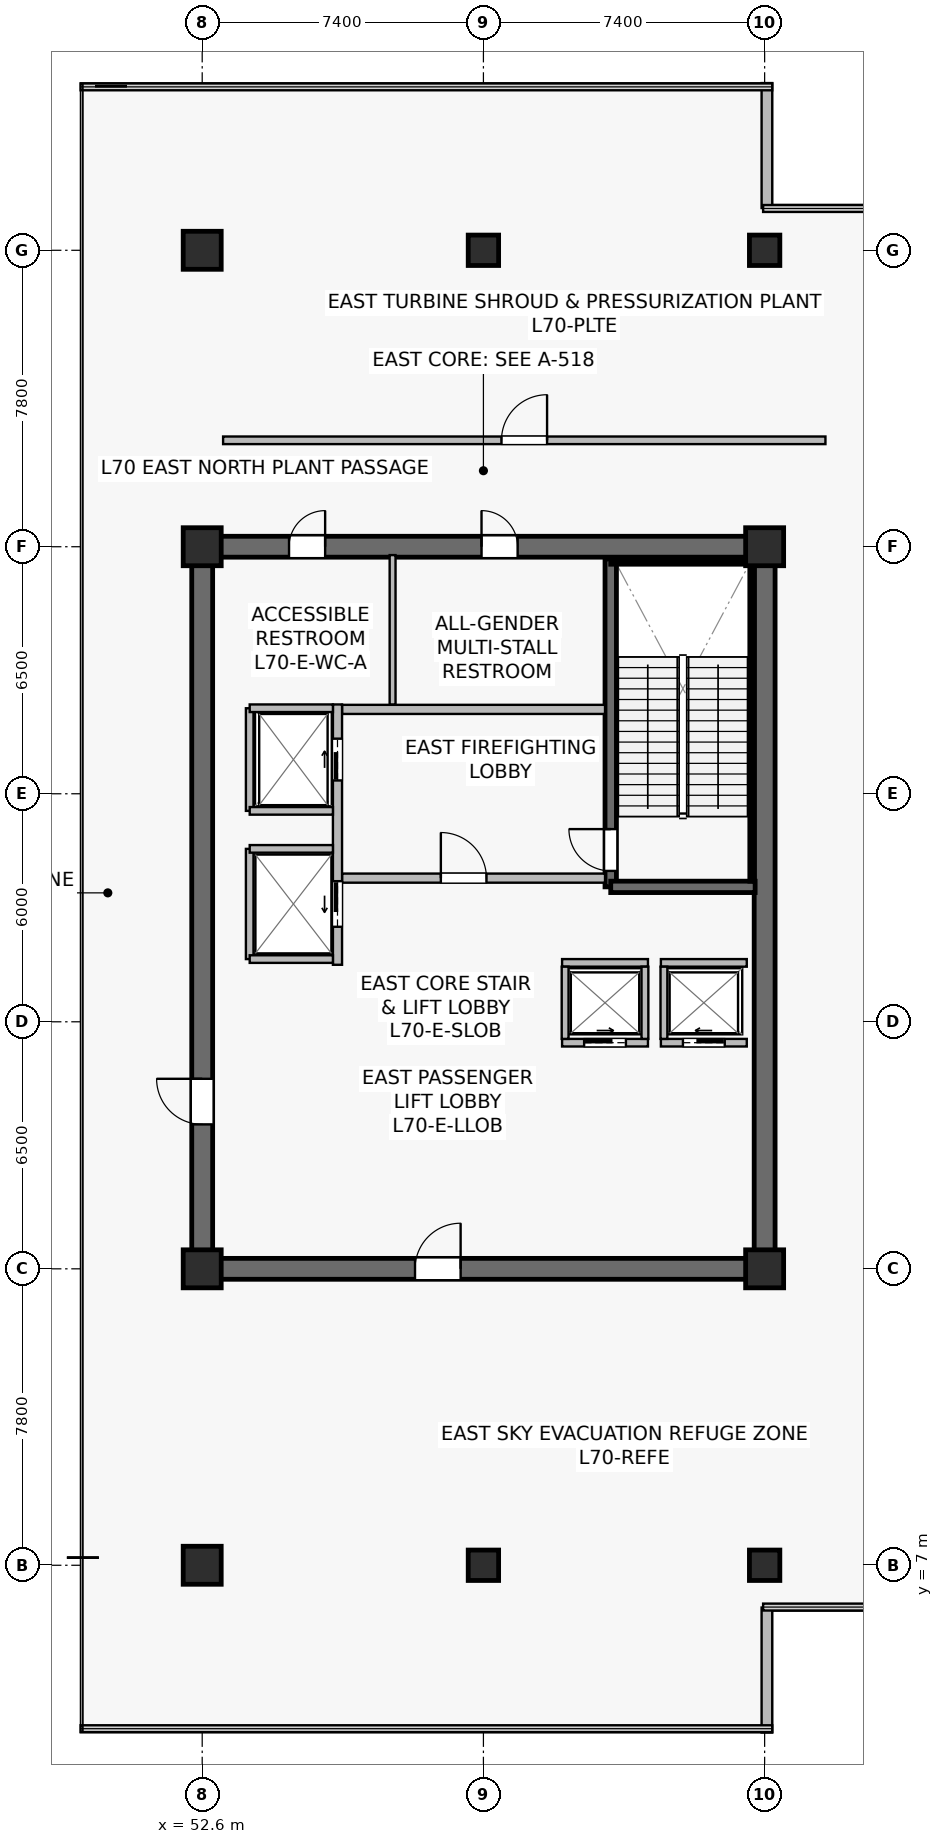
"""IFC4 building model, lengths in metres.
Left out: names, types, materials, properties, quantities, classifications, styles, units other than length and angle.
Written with IfcOpenShell. Run it as: python <this file> out.ifc"""

import sys

from ifc_helpers import new_model, si_unit, direction, frame, frame_2d, origin, origin_2d, place, context, subcontext, project, spatial, rectangle, extrude, source, transform, mapped, element, fill, save


model = new_model("IFC4")
c1 = context("Model", 3, precision=1e-05, world=origin(), true_north=direction((0.0, 1.0)))
c2 = subcontext(c1, "Body", "Model", "MODEL_VIEW")
j1 = project(units=[si_unit("LENGTHUNIT", "METRE"), si_unit("PLANEANGLEUNIT", "RADIAN")], contexts=[c1])
p1 = place(None, origin())
s1 = spatial("IfcSite", under=j1, at=p1, CompositionType="ELEMENT")
p2 = place(p1, origin())
s2 = spatial("IfcBuilding", under=s1, at=p2, CompositionType="ELEMENT")
p3 = place(p2, frame((0.0, 0.0, 291.6)))
s3 = spatial("IfcBuildingStorey", under=s2, at=p3, CompositionType="ELEMENT", Elevation=291.6)
p4 = place(p3, frame((52.325, 14.8, 0.0), z_axis=(0.0, 0.0, 1.0), x_axis=(1.0, 0.0, 0.0)))
e1 = element("IfcWall", 1, at=p4, inside=s3, PredefinedType="SHEAR", context=c2, shape_type="SweptSolid", body=[
    extrude(rectangle(XDim=15.35, YDim=0.55, at=frame_2d((7.675, 0.0))), origin(), (0.0, 0.0, 1.0), 5.7),
])
p5 = place(p4, frame((5.875, 0.0, 0.0)))
e2 = element("IfcOpeningElement", 2, at=p5, cuts=e1, PredefinedType="OPENING", context=c2, shape_type="SweptSolid", body=[
    extrude(rectangle(XDim=1.2, YDim=2.16, at=frame_2d((0.6, 1.08))), frame((0.0, 0.285, 0.0), z_axis=(0.0, -1.0, 0.0), x_axis=(1.0, 0.0, 0.0)), (0.0, 0.0, 1.0), 0.57),
])
p6 = place(p3, frame((52.325, 33.8, 0.0), z_axis=(0.0, 0.0, 1.0), x_axis=(1.0, 0.0, 0.0)))
e3 = element("IfcWall", 3, at=p6, inside=s3, PredefinedType="SHEAR", context=c2, shape_type="SweptSolid", body=[
    extrude(rectangle(XDim=15.35, YDim=0.55, at=frame_2d((7.675, 0.0))), origin(), (0.0, 0.0, 1.0), 5.7),
])
p7 = place(p6, frame((7.625, 0.0, 0.0)))
e4 = element("IfcOpeningElement", 4, at=p7, cuts=e3, PredefinedType="OPENING", context=c2, shape_type="SweptSolid", body=[
    extrude(rectangle(XDim=0.95, YDim=2.15, at=frame_2d((0.475, 1.075))), frame((0.0, 0.285, 0.0), z_axis=(0.0, -1.0, 0.0), x_axis=(1.0, 0.0, 0.0)), (0.0, 0.0, 1.0), 0.57),
])
p8 = place(p6, frame((2.56, 0.0, 0.0)))
e5 = element("IfcOpeningElement", 5, at=p8, cuts=e3, PredefinedType="OPENING", context=c2, shape_type="SweptSolid", body=[
    extrude(rectangle(XDim=0.95, YDim=2.15, at=frame_2d((0.475, 1.075))), frame((0.0, 0.285, 0.0), z_axis=(0.0, -1.0, 0.0), x_axis=(1.0, 0.0, 0.0)), (0.0, 0.0, 1.0), 0.57),
])
p9 = place(p3, frame((52.6, 15.075, 0.0), z_axis=(0.0, 0.0, 1.0), x_axis=(0.0, 1.0, 0.0)))
e6 = element("IfcWall", 6, at=p9, inside=s3, PredefinedType="SHEAR", context=c2, shape_type="SweptSolid", body=[
    extrude(rectangle(XDim=18.45, YDim=0.55, at=frame_2d((9.225, 0.0))), origin(), (0.0, 0.0, 1.0), 5.7),
])
p10 = place(p9, frame((3.525, 0.0, 0.0)))
e7 = element("IfcOpeningElement", 7, at=p10, cuts=e6, PredefinedType="OPENING", context=c2, shape_type="SweptSolid", body=[
    extrude(rectangle(XDim=1.2, YDim=2.16, at=frame_2d((0.6, 1.08))), frame((0.0, 0.285, 0.0), z_axis=(0.0, -1.0, 0.0), x_axis=(1.0, 0.0, 0.0)), (0.0, 0.0, 1.0), 0.57),
])
p11 = place(p3, frame((67.4, 15.075, 0.0), z_axis=(0.0, 0.0, 1.0), x_axis=(0.0, 1.0, 0.0)))
e8 = element("IfcWall", 8, at=p11, inside=s3, PredefinedType="SHEAR", context=c2, shape_type="SweptSolid", body=[
    extrude(rectangle(XDim=18.45, YDim=0.55, at=frame_2d((9.225, 0.0))), origin(), (0.0, 0.0, 1.0), 5.7),
])
p12 = place(p3, frame((63.35, 24.85, 0.0), z_axis=(0.0, 0.0, 1.0), x_axis=(0.0, 1.0, 0.0)))
e9 = element("IfcWall", 9, at=p12, inside=s3, PredefinedType="SHEAR", context=c2, shape_type="SweptSolid", body=[
    extrude(rectangle(XDim=8.63, YDim=0.3, at=frame_2d((4.315, 0.0))), origin(), (0.0, 0.0, 1.0), 5.7),
])
p13 = place(p12, frame((0.42, 0.0, 0.0)))
e10 = element("IfcOpeningElement", 10, at=p13, cuts=e9, PredefinedType="OPENING", context=c2, shape_type="SweptSolid", body=[
    extrude(rectangle(XDim=1.1, YDim=2.15, at=frame_2d((0.55, 1.075))), frame((0.0, 0.16, 0.0), z_axis=(0.0, -1.0, 0.0), x_axis=(1.0, 0.0, 0.0)), (0.0, 0.0, 1.0), 0.32),
])
p14 = place(p3, frame((63.35, 24.85, 0.0), z_axis=(0.0, 0.0, 1.0), x_axis=(1.0, 0.0, 0.0)))
e11 = element("IfcWall", 11, at=p14, inside=s3, PredefinedType="SHEAR", context=c2, shape_type="SweptSolid", body=[
    extrude(rectangle(XDim=3.8, YDim=0.3, at=frame_2d((1.9, 0.0))), origin(), (0.0, 0.0, 1.0), 5.7),
])
p15 = place(p3, frame((63.35, 33.4, 0.0), z_axis=(0.0, 0.0, 1.0), x_axis=(1.0, 0.0, 0.0)))
e12 = element("IfcWall", 12, at=p15, inside=s3, PredefinedType="SOLIDWALL", context=c2, shape_type="SweptSolid", body=[
    extrude(rectangle(XDim=3.72, YDim=0.12, at=frame_2d((1.86, 0.0))), origin(), (0.0, 0.0, 1.0), 5.7),
])
p16 = place(p3, frame((67.07, 25.0, 0.0), z_axis=(0.0, 0.0, 1.0), x_axis=(0.0, 1.0, 0.0)))
e13 = element("IfcWall", 13, at=p16, inside=s3, PredefinedType="SOLIDWALL", context=c2, shape_type="SweptSolid", body=[
    extrude(rectangle(XDim=8.32, YDim=0.12, at=frame_2d((4.16, 0.0))), origin(), (0.0, 0.0, 1.0), 5.7),
])
m1 = source(origin(), c2, "Body", "SweptSolid", [
    extrude(rectangle(XDim=1.0, YDim=1.0, at=origin_2d()), origin(), (0.0, 0.0, 1.0), 6.0),
])
p17 = place(p3, frame((52.6, 7.0, 0.0), z_axis=(0.0, 0.0, 1.0), x_axis=(1.0, 0.0, 0.0)))
e14 = element("IfcColumn", 14, at=p17, inside=s3, PredefinedType="COLUMN", context=c2, shape_type="MappedRepresentation", body=[
    mapped(m1, transform((0.0, 0.0, 0.0), scale=1.0)),
])
m2 = source(origin(), c2, "Body", "SweptSolid", [
    extrude(rectangle(XDim=0.8, YDim=0.8, at=origin_2d()), origin(), (0.0, 0.0, 1.0), 6.0),
])
p18 = place(p3, frame((60.0, 7.0, 0.0), z_axis=(0.0, 0.0, 1.0), x_axis=(1.0, 0.0, 0.0)))
e15 = element("IfcColumn", 15, at=p18, inside=s3, PredefinedType="COLUMN", context=c2, shape_type="MappedRepresentation", body=[
    mapped(m2, transform((0.0, 0.0, 0.0), scale=1.0)),
])
for number, where, z_axis, x_axis in (
    (16, (52.6, 14.8, 0.0), (0.0, 0.0, 1.0), (1.0, 0.0, 0.0)),
    (17, (67.4, 14.8, 0.0), (0.0, 0.0, 1.0), (1.0, 0.0, 0.0)),
    (18, (52.6, 33.8, 0.0), (0.0, 0.0, 1.0), (1.0, 0.0, 0.0)),
    (19, (67.4, 33.8, 0.0), (0.0, 0.0, 1.0), (1.0, 0.0, 0.0)),
    (20, (52.6, 41.6, 0.0), (0.0, 0.0, 1.0), (1.0, 0.0, 0.0)),
):
    element("IfcColumn", number, at=place(p3, frame(where, z_axis=z_axis, x_axis=x_axis)), inside=s3, PredefinedType="COLUMN", context=c2, shape_type="MappedRepresentation", body=[
        mapped(m1, transform((0.0, 0.0, 0.0), scale=1.0)),
    ])
for number, where, z_axis, x_axis in (
    (21, (60.0, 41.6, 0.0), (0.0, 0.0, 1.0), (1.0, 0.0, 0.0)),
    (22, (67.4, 7.0, 0.0), (0.0, 0.0, 1.0), (1.0, 0.0, 0.0)),
    (23, (67.4, 41.6, 0.0), (0.0, 0.0, 1.0), (1.0, 0.0, 0.0)),
):
    element("IfcColumn", number, at=place(p3, frame(where, z_axis=z_axis, x_axis=x_axis)), inside=s3, PredefinedType="COLUMN", context=c2, shape_type="MappedRepresentation", body=[
        mapped(m2, transform((0.0, 0.0, 0.0), scale=1.0)),
    ])
p19 = place(p3, frame((67.46, 2.6, 0.0), z_axis=(0.0, 0.0, 1.0), x_axis=(0.0, 1.0, 0.0)))
e24 = element("IfcWall", 24, at=p19, inside=s3, PredefinedType="STANDARD", context=c2, shape_type="SweptSolid", body=[
    extrude(rectangle(XDim=3.288, YDim=0.28, at=frame_2d((1.644, 0.0))), origin(), (0.0, 0.0, 1.0), 5.7),
])
p20 = place(p3, frame((67.46, 42.712, 0.0), z_axis=(0.0, 0.0, 1.0), x_axis=(0.0, 1.0, 0.0)))
e25 = element("IfcWall", 25, at=p20, inside=s3, PredefinedType="STANDARD", context=c2, shape_type="SweptSolid", body=[
    extrude(rectangle(XDim=3.288, YDim=0.28, at=frame_2d((1.644, 0.0))), origin(), (0.0, 0.0, 1.0), 5.7),
])
p21 = place(p3, frame((56.28, 25.08, 0.0), z_axis=(0.0, 0.0, 1.0), x_axis=(1.0, 0.0, 0.0)))
e26 = element("IfcWall", 26, at=p21, inside=s3, PredefinedType="SOLIDWALL", context=c2, shape_type="SweptSolid", body=[
    extrude(rectangle(XDim=6.92, YDim=0.24, at=frame_2d((3.46, 0.0))), origin(), (0.0, 0.0, 1.0), 5.097),
])
p22 = place(p21, frame((2.6, 0.0, 0.0)))
e27 = element("IfcOpeningElement", 27, at=p22, cuts=e26, PredefinedType="OPENING", context=c2, shape_type="SweptSolid", body=[
    extrude(rectangle(XDim=1.2, YDim=2.16, at=frame_2d((0.6, 1.08))), frame((0.0, 0.13, 0.0), z_axis=(0.0, -1.0, 0.0), x_axis=(1.0, 0.0, 0.0)), (0.0, 0.0, 1.0), 0.26),
])
p23 = place(p3, frame((56.28, 29.52, 0.0), z_axis=(0.0, 0.0, 1.0), x_axis=(1.0, 0.0, 0.0)))
e28 = element("IfcWall", 28, at=p23, inside=s3, PredefinedType="SOLIDWALL", context=c2, shape_type="SweptSolid", body=[
    extrude(rectangle(XDim=6.92, YDim=0.24, at=frame_2d((3.46, 0.0))), origin(), (0.0, 0.0, 1.0), 5.097),
])
p24 = place(p3, frame((56.16, 22.8, 0.0), z_axis=(0.0, 0.0, 1.0), x_axis=(0.0, 1.0, 0.0)))
e29 = element("IfcWall", 29, at=p24, inside=s3, PredefinedType="SOLIDWALL", context=c2, shape_type="SweptSolid", body=[
    extrude(rectangle(XDim=6.85, YDim=0.24, at=frame_2d((3.425, 0.0))), origin(), (0.0, 0.0, 1.0), 4.835),
])
p25 = place(p24, frame((4.85, 0.0, 0.0)))
e30 = element("IfcOpeningElement", 30, at=p25, cuts=e29, PredefinedType="OPENING", context=c2, shape_type="SweptSolid", body=[
    extrude(rectangle(XDim=1.1, YDim=2.22, at=frame_2d((0.55, 1.11))), frame((0.0, 0.13, 0.0), z_axis=(0.0, -1.0, 0.0), x_axis=(1.0, 0.0, 0.0)), (0.0, 0.0, 1.0), 0.26),
])
p26 = place(p24, frame((1.0, 0.0, 0.0)))
e31 = element("IfcOpeningElement", 31, at=p26, cuts=e29, PredefinedType="OPENING", context=c2, shape_type="SweptSolid", body=[
    extrude(rectangle(XDim=1.2, YDim=2.22, at=frame_2d((0.6, 1.11))), frame((0.0, 0.13, 0.0), z_axis=(0.0, -1.0, 0.0), x_axis=(1.0, 0.0, 0.0)), (0.0, 0.0, 1.0), 0.26),
])
p27 = place(p3, frame((64.67, 20.75, 0.0), z_axis=(0.0, 0.0, 1.0), x_axis=(1.0, 0.0, 0.0)))
e32 = element("IfcWall", 32, at=p27, inside=s3, PredefinedType="SOLIDWALL", context=c2, shape_type="SweptSolid", body=[
    extrude(rectangle(XDim=2.26, YDim=0.2, at=frame_2d((1.13, 0.0))), origin(), (0.0, 0.0, 1.0), 5.7),
])
p28 = place(p27, frame((0.58, 0.0, 0.0)))
e33 = element("IfcOpeningElement", 33, at=p28, cuts=e32, PredefinedType="OPENING", context=c2, shape_type="SweptSolid", body=[
    extrude(rectangle(XDim=1.1, YDim=2.22, at=frame_2d((0.55, 1.11))), frame((0.0, 0.11, 0.0), z_axis=(0.0, -1.0, 0.0), x_axis=(1.0, 0.0, 0.0)), (0.0, 0.0, 1.0), 0.22),
])
p29 = place(p3, frame((64.67, 22.85, 0.0), z_axis=(0.0, 0.0, 1.0), x_axis=(1.0, 0.0, 0.0)))
e34 = element("IfcWall", 34, at=p29, inside=s3, PredefinedType="SOLIDWALL", context=c2, shape_type="SweptSolid", body=[
    extrude(rectangle(XDim=2.26, YDim=0.2, at=frame_2d((1.13, 0.0))), origin(), (0.0, 0.0, 1.0), 5.7),
])
p30 = place(p3, frame((64.75, 20.85, 0.0), z_axis=(0.0, 0.0, 1.0), x_axis=(0.0, 1.0, 0.0)))
e35 = element("IfcWall", 35, at=p30, inside=s3, PredefinedType="SOLIDWALL", context=c2, shape_type="SweptSolid", body=[
    extrude(rectangle(XDim=1.9, YDim=0.18, at=frame_2d((0.95, 0.0))), origin(), (0.0, 0.0, 1.0), 5.7),
])
p31 = place(p3, frame((62.07, 20.75, 0.0), z_axis=(0.0, 0.0, 1.0), x_axis=(1.0, 0.0, 0.0)))
e36 = element("IfcWall", 36, at=p31, inside=s3, PredefinedType="SOLIDWALL", context=c2, shape_type="SweptSolid", body=[
    extrude(rectangle(XDim=2.26, YDim=0.2, at=frame_2d((1.13, 0.0))), origin(), (0.0, 0.0, 1.0), 5.7),
])
p32 = place(p31, frame((0.58, 0.0, 0.0)))
e37 = element("IfcOpeningElement", 37, at=p32, cuts=e36, PredefinedType="OPENING", context=c2, shape_type="SweptSolid", body=[
    extrude(rectangle(XDim=1.1, YDim=2.22, at=frame_2d((0.55, 1.11))), frame((0.0, 0.11, 0.0), z_axis=(0.0, -1.0, 0.0), x_axis=(1.0, 0.0, 0.0)), (0.0, 0.0, 1.0), 0.22),
])
p33 = place(p3, frame((62.07, 22.85, 0.0), z_axis=(0.0, 0.0, 1.0), x_axis=(1.0, 0.0, 0.0)))
e38 = element("IfcWall", 38, at=p33, inside=s3, PredefinedType="SOLIDWALL", context=c2, shape_type="SweptSolid", body=[
    extrude(rectangle(XDim=2.26, YDim=0.2, at=frame_2d((1.13, 0.0))), origin(), (0.0, 0.0, 1.0), 5.7),
])
for number, where, z_axis, x_axis in (
    (39, (62.15, 20.85, 0.0), (0.0, 0.0, 1.0), (0.0, 1.0, 0.0)),
    (40, (64.25, 20.85, 0.0), (0.0, 0.0, 1.0), (0.0, 1.0, 0.0)),
):
    element("IfcWall", number, at=place(p3, frame(where, z_axis=z_axis, x_axis=x_axis)), inside=s3, PredefinedType="SOLIDWALL", context=c2, shape_type="SweptSolid", body=[
        extrude(rectangle(XDim=1.9, YDim=0.18, at=frame_2d((0.95, 0.0))), origin(), (0.0, 0.0, 1.0), 5.7),
    ])
p34 = place(p3, frame((53.85, 26.85, 0.0), z_axis=(0.0, 0.0, 1.0), x_axis=(0.0, 1.0, 0.0)))
e41 = element("IfcWall", 41, at=p34, inside=s3, PredefinedType="SOLIDWALL", context=c2, shape_type="SweptSolid", body=[
    extrude(rectangle(XDim=2.7, YDim=0.2, at=frame_2d((1.35, 0.0))), origin(), (0.0, 0.0, 1.0), 5.7),
])
p35 = place(p3, frame((53.85, 29.55, 0.0), z_axis=(0.0, 0.0, 1.0), x_axis=(1.0, 0.0, 0.0)))
e42 = element("IfcWall", 42, at=p35, inside=s3, PredefinedType="SOLIDWALL", context=c2, shape_type="SweptSolid", body=[
    extrude(rectangle(XDim=2.19, YDim=0.2, at=frame_2d((1.095, 0.0))), origin(), (0.0, 0.0, 1.0), 5.7),
])
p36 = place(p3, frame((53.85, 26.85, 0.0), z_axis=(0.0, 0.0, 1.0), x_axis=(1.0, 0.0, 0.0)))
e43 = element("IfcWall", 43, at=p36, inside=s3, PredefinedType="SOLIDWALL", context=c2, shape_type="SweptSolid", body=[
    extrude(rectangle(XDim=2.19, YDim=0.2, at=frame_2d((1.095, 0.0))), origin(), (0.0, 0.0, 1.0), 5.097),
])
p37 = place(p3, frame((53.85, 22.95, 0.0), z_axis=(0.0, 0.0, 1.0), x_axis=(0.0, 1.0, 0.0)))
e44 = element("IfcWall", 44, at=p37, inside=s3, PredefinedType="SOLIDWALL", context=c2, shape_type="SweptSolid", body=[
    extrude(rectangle(XDim=2.9, YDim=0.2, at=frame_2d((1.45, 0.0))), origin(), (0.0, 0.0, 1.0), 4.835),
])
for number, where, z_axis, x_axis in (
    (45, (53.85, 25.85, 0.0), (0.0, 0.0, 1.0), (1.0, 0.0, 0.0)),
    (46, (53.85, 22.95, 0.0), (0.0, 0.0, 1.0), (1.0, 0.0, 0.0)),
):
    element("IfcWall", number, at=place(p3, frame(where, z_axis=z_axis, x_axis=x_axis)), inside=s3, PredefinedType="SOLIDWALL", context=c2, shape_type="SweptSolid", body=[
        extrude(rectangle(XDim=2.19, YDim=0.2, at=frame_2d((1.095, 0.0))), origin(), (0.0, 0.0, 1.0), 5.7),
    ])
p38 = place(p3, frame((57.61, 29.65, 0.0), z_axis=(0.0, 0.0, 1.0), x_axis=(0.0, 1.0, 0.0)))
e47 = element("IfcWall", 47, at=p38, inside=s3, PredefinedType="PLUMBINGWALL", context=c2, shape_type="SweptSolid", body=[
    extrude(rectangle(XDim=3.93, YDim=0.155, at=frame_2d((1.965, 0.0))), origin(), (0.0, 0.0, 1.0), 5.7),
])
p39 = place(p3, frame((53.15, 36.6, 0.0), z_axis=(0.0, 0.0, 1.0), x_axis=(1.0, 0.0, 0.0)))
e48 = element("IfcWall", 48, at=p39, inside=s3, PredefinedType="SOLIDWALL", context=c2, shape_type="SweptSolid", body=[
    extrude(rectangle(XDim=15.85, YDim=0.2, at=frame_2d((7.925, 0.0))), origin(), (0.0, 0.0, 1.0), 5.097),
])
p40 = place(p39, frame((7.325, 0.0, 0.0)))
e49 = element("IfcOpeningElement", 49, at=p40, cuts=e48, PredefinedType="OPENING", context=c2, shape_type="SweptSolid", body=[
    extrude(rectangle(XDim=1.2, YDim=2.16, at=frame_2d((0.6, 1.08))), frame((0.0, 0.11, 0.0), z_axis=(0.0, -1.0, 0.0), x_axis=(1.0, 0.0, 0.0)), (0.0, 0.0, 1.0), 0.22),
])
m3 = source(origin(), c2, "Body", "SweptSolid", [
    extrude(rectangle(XDim=1.1, YDim=2.15, at=frame_2d((0.55, 1.075))), frame((0.0, 0.025, 0.0), z_axis=(0.0, -1.0, 0.0), x_axis=(1.0, 0.0, 0.0)), (0.0, 0.0, 1.0), 0.05),
])
p41 = place(p13, origin())
e50 = element("IfcDoor", 50, at=p41, inside=s3, OperationType="SINGLE_SWING_RIGHT", PredefinedType="DOOR", context=c2, shape_type="MappedRepresentation", body=[
    mapped(m3, transform((0.0, 0.0, 0.0), scale=1.0)),
])
fill(e10, e50)
m4 = source(origin(), c2, "Body", "SweptSolid", [
    extrude(rectangle(XDim=1.2, YDim=2.16, at=frame_2d((0.6, 1.08))), frame((0.0, 0.025, 0.0), z_axis=(0.0, -1.0, 0.0), x_axis=(1.0, 0.0, 0.0)), (0.0, 0.0, 1.0), 0.05),
])
p42 = place(p22, origin())
e51 = element("IfcDoor", 51, at=p42, inside=s3, OperationType="SINGLE_SWING_LEFT", PredefinedType="DOOR", context=c2, shape_type="MappedRepresentation", body=[
    mapped(m4, transform((0.0, 0.0, 0.0), scale=1.0)),
])
fill(e27, e51)
m5 = source(origin(), c2, "Body", "SweptSolid", [
    extrude(rectangle(XDim=1.1, YDim=2.22, at=frame_2d((0.55, 1.11))), frame((0.0, 0.025, 0.0), z_axis=(0.0, -1.0, 0.0), x_axis=(1.0, 0.0, 0.0)), (0.0, 0.0, 1.0), 0.05),
])
p43 = place(p28, origin())
e52 = element("IfcDoor", 52, at=p43, inside=s3, OperationType="SLIDING_TO_LEFT", PredefinedType="USERDEFINED", context=c2, shape_type="MappedRepresentation", body=[
    mapped(m5, transform((0.0, 0.0, 0.0), scale=1.0)),
])
fill(e33, e52)
p44 = place(p32, origin())
e53 = element("IfcDoor", 53, at=p44, inside=s3, OperationType="SLIDING_TO_RIGHT", PredefinedType="USERDEFINED", context=c2, shape_type="MappedRepresentation", body=[
    mapped(m5, transform((0.0, 0.0, 0.0), scale=1.0)),
])
fill(e37, e53)
p45 = place(p25, origin())
e54 = element("IfcDoor", 54, at=p45, inside=s3, OperationType="SLIDING_TO_RIGHT", PredefinedType="USERDEFINED", context=c2, shape_type="MappedRepresentation", body=[
    mapped(m5, transform((0.0, 0.0, 0.0), scale=1.0)),
])
fill(e30, e54)
m6 = source(origin(), c2, "Body", "SweptSolid", [
    extrude(rectangle(XDim=1.2, YDim=2.22, at=frame_2d((0.6, 1.11))), frame((0.0, 0.025, 0.0), z_axis=(0.0, -1.0, 0.0), x_axis=(1.0, 0.0, 0.0)), (0.0, 0.0, 1.0), 0.05),
])
p46 = place(p26, origin())
e55 = element("IfcDoor", 55, at=p46, inside=s3, OperationType="SLIDING_TO_LEFT", PredefinedType="USERDEFINED", context=c2, shape_type="MappedRepresentation", body=[
    mapped(m6, transform((0.0, 0.0, 0.0), scale=1.0)),
])
fill(e31, e55)
p47 = place(p5, origin())
e56 = element("IfcDoor", 56, at=p47, inside=s3, OperationType="SINGLE_SWING_RIGHT", PredefinedType="DOOR", context=c2, shape_type="MappedRepresentation", body=[
    mapped(m4, transform((0.0, 0.0, 0.0), scale=1.0)),
])
fill(e2, e56)
p48 = place(p10, origin())
e57 = element("IfcDoor", 57, at=p48, inside=s3, OperationType="SINGLE_SWING_RIGHT", PredefinedType="DOOR", context=c2, shape_type="MappedRepresentation", body=[
    mapped(m4, transform((0.0, 0.0, 0.0), scale=1.0)),
])
fill(e7, e57)
m7 = source(origin(), c2, "Body", "SweptSolid", [
    extrude(rectangle(XDim=0.95, YDim=2.15, at=frame_2d((0.475, 1.075))), frame((0.0, 0.025, 0.0), z_axis=(0.0, -1.0, 0.0), x_axis=(1.0, 0.0, 0.0)), (0.0, 0.0, 1.0), 0.05),
])
p49 = place(p7, origin())
e58 = element("IfcDoor", 58, at=p49, inside=s3, OperationType="SINGLE_SWING_LEFT", PredefinedType="DOOR", context=c2, shape_type="MappedRepresentation", body=[
    mapped(m7, transform((0.0, 0.0, 0.0), scale=1.0)),
])
fill(e4, e58)
p50 = place(p8, origin())
e59 = element("IfcDoor", 59, at=p50, inside=s3, OperationType="SINGLE_SWING_RIGHT", PredefinedType="DOOR", context=c2, shape_type="MappedRepresentation", body=[
    mapped(m7, transform((0.0, 0.0, 0.0), scale=1.0)),
])
fill(e5, e59)
p51 = place(p40, origin())
e60 = element("IfcDoor", 60, at=p51, inside=s3, OperationType="SINGLE_SWING_RIGHT", PredefinedType="DOOR", context=c2, shape_type="MappedRepresentation", body=[
    mapped(m4, transform((0.0, 0.0, 0.0), scale=1.0)),
])
fill(e49, e60)
save(model, sys.argv[1])
